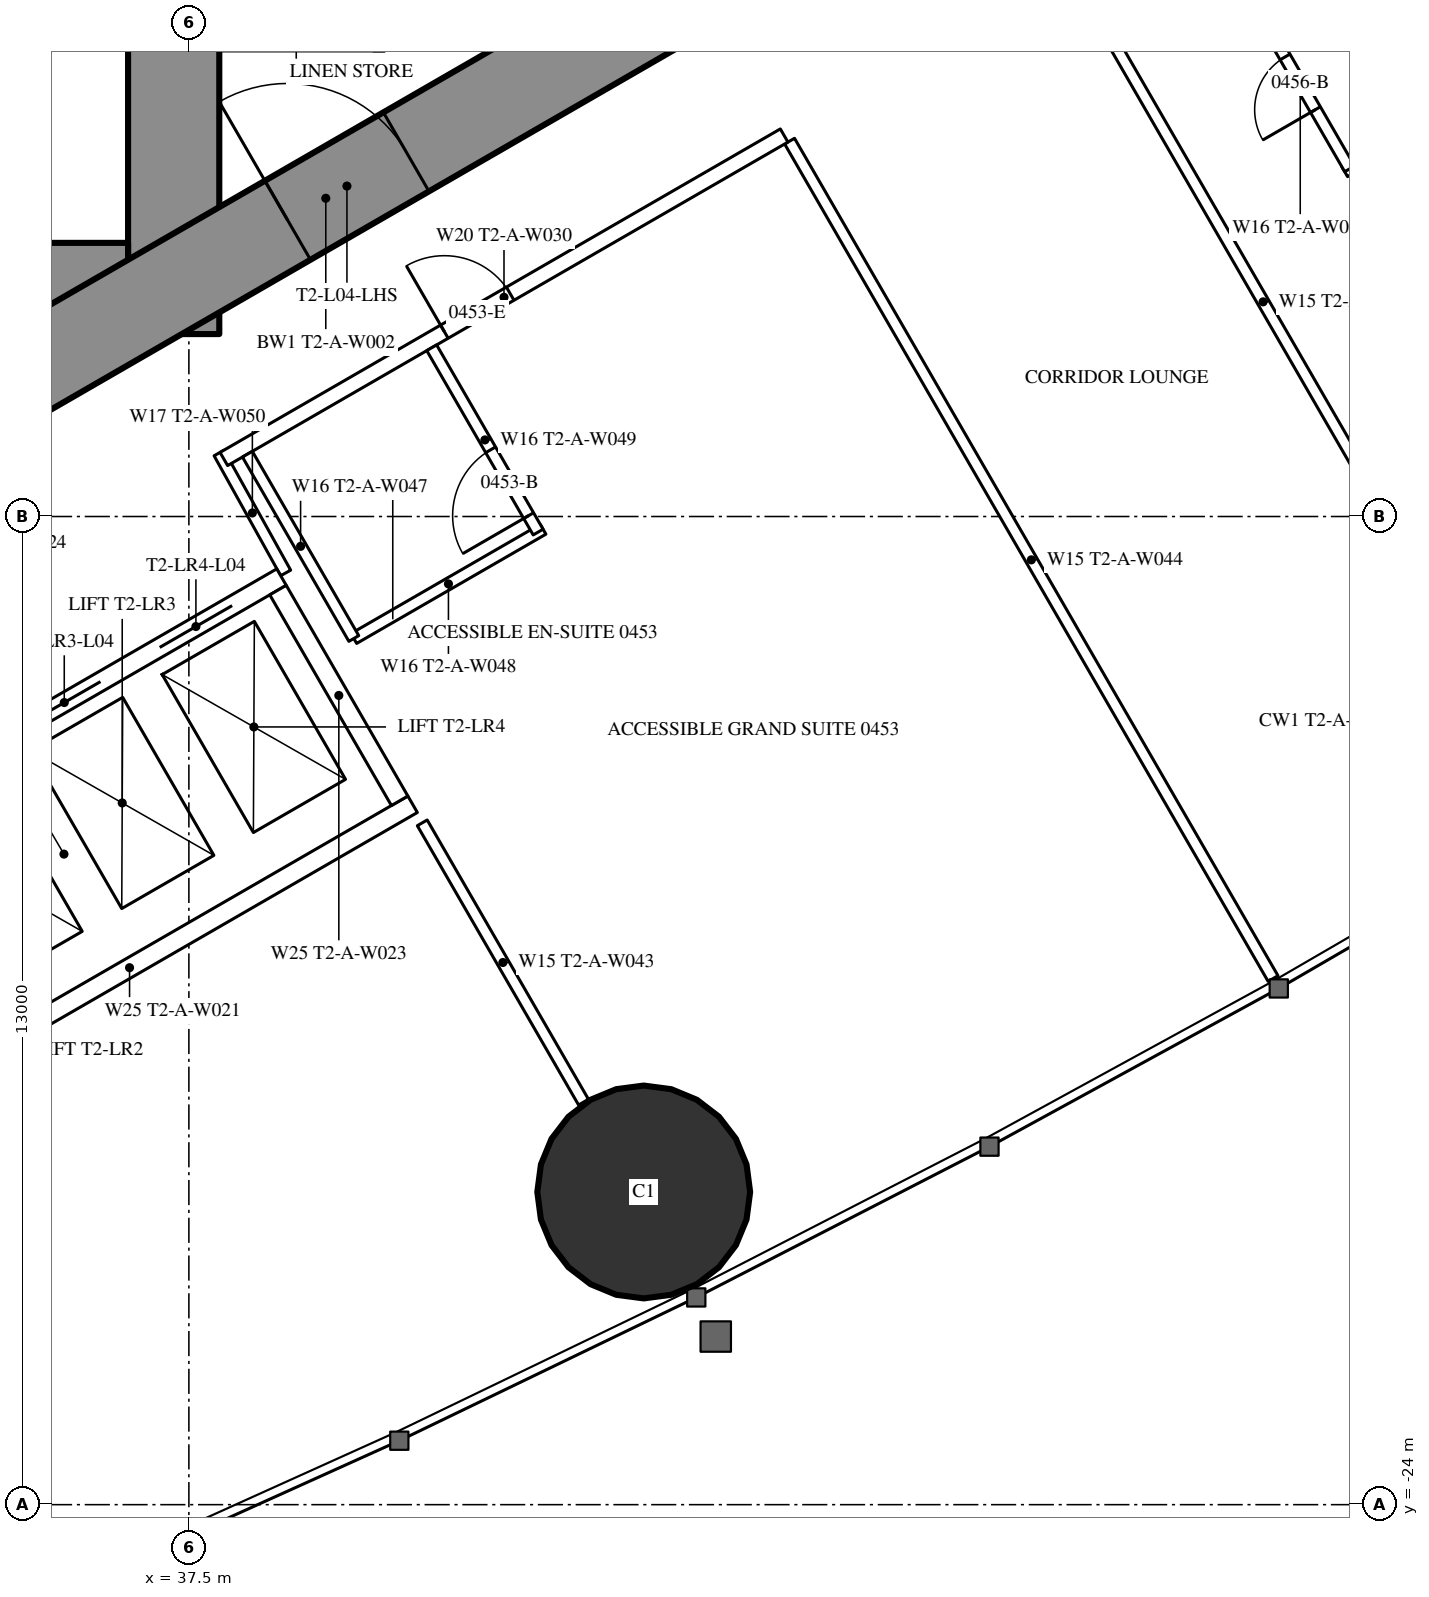
"""IFC4 building model, lengths in metres.
Left out: names, types, materials, properties, quantities, classifications, styles, units other than length and angle.
Written with IfcOpenShell. Run it as: python <this file> out.ifc"""

import sys

from ifc_helpers import new_model, si_unit, direction, frame, frame_2d, origin, origin_2d, place, context, subcontext, project, spatial, rectangle, hollow_circle, extrude, element, fill, save


model = new_model("IFC4")
c1 = context("Model", 3, precision=1e-05, world=origin(), true_north=direction((0.0, 1.0)))
c2 = subcontext(c1, "Body", "Model", "MODEL_VIEW")
j1 = project(units=[si_unit("LENGTHUNIT", "METRE"), si_unit("PLANEANGLEUNIT", "RADIAN")], contexts=[c1])
p1 = place(None, origin())
s1 = spatial("IfcSite", under=j1, at=p1, CompositionType="ELEMENT")
p2 = place(p1, origin())
s2 = spatial("IfcBuilding", under=s1, at=p2, CompositionType="ELEMENT")
p3 = place(p2, frame((0.0, 0.0, 21.5)))
s3 = spatial("IfcBuildingStorey", under=s2, at=p3, CompositionType="ELEMENT", Elevation=21.5)
p4 = place(p3, frame((43.484, -19.886, 0.0), z_axis=(0.0, 0.0, 1.0), x_axis=(1.0, 0.0, 0.0)))
e1 = element("IfcColumn", 1, at=p4, inside=s3, PredefinedType="COLUMN", context=c2, shape_type="SweptSolid", body=[
    extrude(hollow_circle(Radius=1.4, WallThickness=0.12, at=origin_2d()), origin(), (0.0, 0.0, 1.0), 3.5),
])
p5 = place(p3, frame((37.3, -8.6, 0.0), z_axis=(0.0, 0.0, 1.0), x_axis=(0.0, 1.0, 0.0)))
e2 = element("IfcWall", 2, at=p5, inside=s3, PredefinedType="SHEAR", context=c2, shape_type="SweptSolid", body=[
    extrude(rectangle(XDim=17.2, YDim=1.2, at=frame_2d((8.6, 0.0))), origin(), (0.0, 0.0, 1.0), 3.5),
])
p6 = place(p5, frame((7.7, 0.0, 0.0)))
e3 = element("IfcOpeningElement", 3, at=p6, cuts=e2, PredefinedType="OPENING", context=c2, shape_type="SweptSolid", body=[
    extrude(rectangle(XDim=1.8, YDim=2.2, at=frame_2d((0.9, 1.1))), frame((0.0, 0.61, 0.0), z_axis=(0.0, -1.0, 0.0), x_axis=(1.0, 0.0, 0.0)), (0.0, 0.0, 1.0), 1.22),
])
p7 = place(p3, frame((28.3, -8.0, 0.0), z_axis=(0.0, 0.0, 1.0), x_axis=(1.0, 0.0, 0.0)))
e4 = element("IfcWall", 4, at=p7, inside=s3, PredefinedType="SHEAR", context=c2, shape_type="SweptSolid", body=[
    extrude(rectangle(XDim=8.4, YDim=1.2, at=frame_2d((4.2, 0.0))), origin(), (0.0, 0.0, 1.0), 3.5),
])
p8 = place(p7, frame((0.25, 0.0, 0.0)))
e5 = element("IfcOpeningElement", 5, at=p8, cuts=e4, PredefinedType="OPENING", context=c2, shape_type="SweptSolid", body=[
    extrude(rectangle(XDim=1.0, YDim=2.2, at=frame_2d((0.5, 1.1))), frame((0.0, 0.61, 0.0), z_axis=(0.0, -1.0, 0.0), x_axis=(1.0, 0.0, 0.0)), (0.0, 0.0, 1.0), 1.22),
])
p9 = place(p3, frame((27.2, -13.8, 0.0), z_axis=(0.0, 0.0, 1.0), x_axis=(0.866027159892, 0.499996958321, 0.0)))
e6 = element("IfcWall", 6, at=p9, inside=s3, PredefinedType="SHEAR", context=c2, shape_type="SweptSolid", body=[
    extrude(rectangle(XDim=27.947, YDim=1.2, at=frame_2d((13.973, 0.0))), origin(), (0.0, 0.0, 1.0), 3.5),
])
p10 = place(p9, frame((4.6, 0.0, 0.0)))
e7 = element("IfcOpeningElement", 7, at=p10, cuts=e6, PredefinedType="OPENING", context=c2, shape_type="SweptSolid", body=[
    extrude(rectangle(XDim=1.0, YDim=2.2, at=frame_2d((0.5, 1.1))), frame((0.0, 0.61, 0.0), z_axis=(0.0, -1.0, 0.0), x_axis=(1.0, 0.0, 0.0)), (0.0, 0.0, 1.0), 1.22),
])
p11 = place(p9, frame((13.395, 0.0, 0.0)))
e8 = element("IfcOpeningElement", 8, at=p11, cuts=e6, PredefinedType="OPENING", context=c2, shape_type="SweptSolid", body=[
    extrude(rectangle(XDim=1.8, YDim=2.2, at=frame_2d((0.9, 1.1))), frame((0.0, 0.61, 0.0), z_axis=(0.0, -1.0, 0.0), x_axis=(1.0, 0.0, 0.0)), (0.0, 0.0, 1.0), 1.22),
])
p12 = place(p3, frame((45.403, -6.062, 0.0), z_axis=(0.0, 0.0, 1.0), x_axis=(0.500007077968, -0.866021317279, 0.0)))
e9 = element("IfcWall", 9, at=p12, inside=s3, PredefinedType="PARTITIONING", context=c2, shape_type="SweptSolid", body=[
    extrude(rectangle(XDim=12.721, YDim=0.15, at=frame_2d((6.361, 0.0))), origin(), (0.0, 0.0, 1.0), 3.25),
])
p13 = place(p3, frame((49.159, -3.893, 0.0), z_axis=(0.0, 0.0, 1.0), x_axis=(0.499998773722, -0.866026111775, 0.0)))
e10 = element("IfcWall", 10, at=p13, inside=s3, PredefinedType="PARTITIONING", context=c2, shape_type="SweptSolid", body=[
    extrude(rectangle(XDim=9.892, YDim=0.15, at=frame_2d((4.946, 0.0))), origin(), (0.0, 0.0, 1.0), 2.25),
])
p14 = place(p3, frame((40.57, -15.03, 0.0), z_axis=(0.0, 0.0, 1.0), x_axis=(0.500012993597, -0.866017901798, 0.0)))
e11 = element("IfcWall", 11, at=p14, inside=s3, PredefinedType="PARTITIONING", context=c2, shape_type="SweptSolid", body=[
    extrude(rectangle(XDim=4.243, YDim=0.15, at=frame_2d((2.122, 0.0))), origin(), (0.0, 0.0, 1.0), 3.25),
])
p15 = place(p3, frame((38.773, -11.742, 0.0), z_axis=(0.0, 0.0, 1.0), x_axis=(-0.485528096672, 0.8742210632, 0.0)))
e12 = element("IfcWall", 12, at=p15, inside=s3, PredefinedType="PARTITIONING", context=c2, shape_type="SweptSolid", body=[
    extrude(rectangle(XDim=1.805, YDim=0.15, at=frame_2d((0.903, 0.0))), origin(), (0.0, 0.0, 1.0), 3.25),
])
p16 = place(p3, frame((37.96, -10.243, 0.0), z_axis=(0.0, 0.0, 1.0), x_axis=(0.866024617314, 0.500001362204, 0.0)))
e13 = element("IfcWall", 13, at=p16, inside=s3, PredefinedType="PARTITIONING", context=c2, shape_type="SweptSolid", body=[
    extrude(rectangle(XDim=8.512, YDim=0.2, at=frame_2d((4.256, 0.0))), origin(), (0.0, 0.0, 1.0), 3.25),
])
p17 = place(p16, frame((3.35, 0.0, 0.0)))
e14 = element("IfcOpeningElement", 14, at=p17, cuts=e13, PredefinedType="OPENING", context=c2, shape_type="SweptSolid", body=[
    extrude(rectangle(XDim=1.0, YDim=2.2, at=frame_2d((0.5, 1.1))), frame((0.0, 0.11, 0.0), z_axis=(0.0, -1.0, 0.0), x_axis=(1.0, 0.0, 0.0)), (0.0, 0.0, 1.0), 0.22),
])
p18 = place(p3, frame((52.706, -6.464, 0.0), z_axis=(0.0, 0.0, 1.0), x_axis=(0.86604923931, 0.499958713387, 0.0)))
e15 = element("IfcWall", 15, at=p18, inside=s3, PredefinedType="PARTITIONING", context=c2, shape_type="SweptSolid", body=[
    extrude(rectangle(XDim=2.475, YDim=0.15, at=frame_2d((1.237, 0.0))), origin(), (0.0, 0.0, 1.0), 3.25),
])
p19 = place(p3, frame((51.471, -4.175, 0.0), z_axis=(0.0, 0.0, 1.0), x_axis=(0.500006934395, -0.866021400173, 0.0)))
e16 = element("IfcWall", 16, at=p19, inside=s3, PredefinedType="PARTITIONING", context=c2, shape_type="SweptSolid", body=[
    extrude(rectangle(XDim=2.6, YDim=0.15, at=frame_2d((1.3, 0.0))), origin(), (0.0, 0.0, 1.0), 3.25),
])
p20 = place(p19, frame((0.9, 0.0, 0.0)))
e17 = element("IfcOpeningElement", 17, at=p20, cuts=e16, PredefinedType="OPENING", context=c2, shape_type="SweptSolid", body=[
    extrude(rectangle(XDim=0.8, YDim=2.2, at=frame_2d((0.4, 1.1))), frame((0.0, 0.085, 0.0), z_axis=(0.0, -1.0, 0.0), x_axis=(1.0, 0.0, 0.0)), (0.0, 0.0, 1.0), 0.17),
])
p21 = place(p3, frame((39.67, -12.605, 0.0), z_axis=(0.0, 0.0, 1.0), x_axis=(0.866018712932, 0.500011588718, 0.0)))
e18 = element("IfcWall", 18, at=p21, inside=s3, PredefinedType="PARTITIONING", context=c2, shape_type="SweptSolid", body=[
    extrude(rectangle(XDim=2.875, YDim=0.15, at=frame_2d((1.438, 0.0))), origin(), (0.0, 0.0, 1.0), 3.25),
])
p22 = place(p3, frame((40.695, -8.78, 0.0), z_axis=(0.0, 0.0, 1.0), x_axis=(0.500049511043, -0.865996816683, 0.0)))
e19 = element("IfcWall", 19, at=p22, inside=s3, PredefinedType="PARTITIONING", context=c2, shape_type="SweptSolid", body=[
    extrude(rectangle(XDim=2.8, YDim=0.15, at=frame_2d((1.4, 0.0))), origin(), (0.0, 0.0, 1.0), 3.25),
])
p23 = place(p22, frame((1.55, 0.0, 0.0)))
e20 = element("IfcOpeningElement", 20, at=p23, cuts=e19, PredefinedType="OPENING", context=c2, shape_type="SweptSolid", body=[
    extrude(rectangle(XDim=1.0, YDim=2.2, at=frame_2d((0.5, 1.1))), frame((0.0, 0.085, 0.0), z_axis=(0.0, -1.0, 0.0), x_axis=(1.0, 0.0, 0.0)), (0.0, 0.0, 1.0), 0.17),
])
p24 = place(p3, frame((38.27, -10.18, 0.0), z_axis=(0.0, 0.0, 1.0), x_axis=(0.500049511043, -0.865996816683, 0.0)))
e21 = element("IfcWall", 21, at=p24, inside=s3, PredefinedType="PARTITIONING", context=c2, shape_type="SweptSolid", body=[
    extrude(rectangle(XDim=2.8, YDim=0.15, at=frame_2d((1.4, 0.0))), origin(), (0.0, 0.0, 1.0), 3.25),
])
p25 = place(p3, frame((31.271, -16.097, 0.0), z_axis=(0.0, 0.0, 1.0), x_axis=(0.86604045752, 0.499973925258, 0.0)))
e22 = element("IfcWall", 22, at=p25, inside=s3, PredefinedType="PARTITIONING", context=c2, shape_type="SweptSolid", body=[
    extrude(rectangle(XDim=8.6, YDim=0.25, at=frame_2d((4.3, 0.0))), origin(), (0.0, 0.0, 1.0), 3.25),
])
p26 = place(p25, frame((0.75, 0.0, 0.0)))
e23 = element("IfcOpeningElement", 23, at=p26, cuts=e22, PredefinedType="OPENING", context=c2, shape_type="SweptSolid", body=[
    extrude(rectangle(XDim=1.1, YDim=2.2, at=frame_2d((0.55, 1.1))), frame((0.0, 0.135, 0.0), z_axis=(0.0, -1.0, 0.0), x_axis=(1.0, 0.0, 0.0)), (0.0, 0.0, 1.0), 0.27),
])
p27 = place(p25, frame((2.75, 0.0, 0.0)))
e24 = element("IfcOpeningElement", 24, at=p27, cuts=e22, PredefinedType="OPENING", context=c2, shape_type="SweptSolid", body=[
    extrude(rectangle(XDim=1.1, YDim=2.2, at=frame_2d((0.55, 1.1))), frame((0.0, 0.135, 0.0), z_axis=(0.0, -1.0, 0.0), x_axis=(1.0, 0.0, 0.0)), (0.0, 0.0, 1.0), 0.27),
])
p28 = place(p25, frame((4.75, 0.0, 0.0)))
e25 = element("IfcOpeningElement", 25, at=p28, cuts=e22, PredefinedType="OPENING", context=c2, shape_type="SweptSolid", body=[
    extrude(rectangle(XDim=1.1, YDim=2.2, at=frame_2d((0.55, 1.1))), frame((0.0, 0.135, 0.0), z_axis=(0.0, -1.0, 0.0), x_axis=(1.0, 0.0, 0.0)), (0.0, 0.0, 1.0), 0.27),
])
p29 = place(p25, frame((6.75, 0.0, 0.0)))
e26 = element("IfcOpeningElement", 26, at=p29, cuts=e22, PredefinedType="OPENING", context=c2, shape_type="SweptSolid", body=[
    extrude(rectangle(XDim=1.1, YDim=2.2, at=frame_2d((0.55, 1.1))), frame((0.0, 0.135, 0.0), z_axis=(0.0, -1.0, 0.0), x_axis=(1.0, 0.0, 0.0)), (0.0, 0.0, 1.0), 0.27),
])
p30 = place(p3, frame((32.996, -19.086, 0.0), z_axis=(0.0, 0.0, 1.0), x_axis=(0.866028165386, 0.499995216735, 0.0)))
e27 = element("IfcWall", 27, at=p30, inside=s3, PredefinedType="PARTITIONING", context=c2, shape_type="SweptSolid", body=[
    extrude(rectangle(XDim=8.6, YDim=0.25, at=frame_2d((4.3, 0.0))), origin(), (0.0, 0.0, 1.0), 3.25),
])
p31 = place(p3, frame((38.673, -11.968, 0.0), z_axis=(0.0, 0.0, 1.0), x_axis=(0.499929347863, -0.866066190972, 0.0)))
e28 = element("IfcWall", 28, at=p31, inside=s3, PredefinedType="PARTITIONING", context=c2, shape_type="SweptSolid", body=[
    extrude(rectangle(XDim=3.201, YDim=0.25, at=frame_2d((1.6, 0.0))), origin(), (0.0, 0.0, 1.0), 3.25),
])
p32 = place(p20, origin())
e29 = element("IfcDoor", 29, at=p32, inside=s3, OperationType="SINGLE_SWING_RIGHT", PredefinedType="DOOR", context=c2, shape_type="SweptSolid", body=[
    extrude(rectangle(XDim=0.8, YDim=2.2, at=frame_2d((0.4, 1.1))), frame((0.0, 0.025, 0.0), z_axis=(0.0, -1.0, 0.0), x_axis=(1.0, 0.0, 0.0)), (0.0, 0.0, 1.0), 0.05),
])
fill(e17, e29)
p33 = place(p23, origin())
e30 = element("IfcDoor", 30, at=p33, inside=s3, OperationType="SINGLE_SWING_RIGHT", PredefinedType="DOOR", context=c2, shape_type="SweptSolid", body=[
    extrude(rectangle(XDim=1.0, YDim=2.2, at=frame_2d((0.5, 1.1))), frame((0.0, 0.025, 0.0), z_axis=(0.0, -1.0, 0.0), x_axis=(1.0, 0.0, 0.0)), (0.0, 0.0, 1.0), 0.05),
])
fill(e20, e30)
p34 = place(p17, origin())
e31 = element("IfcDoor", 31, at=p34, inside=s3, OperationType="SINGLE_SWING_LEFT", PredefinedType="DOOR", context=c2, shape_type="SweptSolid", body=[
    extrude(rectangle(XDim=1.0, YDim=2.2, at=frame_2d((0.5, 1.1))), frame((0.0, 0.025, 0.0), z_axis=(0.0, -1.0, 0.0), x_axis=(1.0, 0.0, 0.0)), (0.0, 0.0, 1.0), 0.05),
])
fill(e14, e31)
p35 = place(p11, origin())
e32 = element("IfcDoor", 32, at=p35, inside=s3, OperationType="DOUBLE_DOOR_SINGLE_SWING", PredefinedType="DOOR", context=c2, shape_type="SweptSolid", body=[
    extrude(rectangle(XDim=1.8, YDim=2.2, at=frame_2d((0.9, 1.1))), frame((0.0, 0.025, 0.0), z_axis=(0.0, -1.0, 0.0), x_axis=(1.0, 0.0, 0.0)), (0.0, 0.0, 1.0), 0.05),
])
fill(e8, e32)
p36 = place(p28, origin())
e33 = element("IfcDoor", 33, at=p36, inside=s3, OperationType="DOUBLE_DOOR_SLIDING", PredefinedType="USERDEFINED", context=c2, shape_type="SweptSolid", body=[
    extrude(rectangle(XDim=1.1, YDim=2.2, at=frame_2d((0.55, 1.1))), frame((0.0, 0.025, 0.0), z_axis=(0.0, -1.0, 0.0), x_axis=(1.0, 0.0, 0.0)), (0.0, 0.0, 1.0), 0.05),
])
fill(e25, e33)
p37 = place(p29, origin())
e34 = element("IfcDoor", 34, at=p37, inside=s3, OperationType="DOUBLE_DOOR_SLIDING", PredefinedType="USERDEFINED", context=c2, shape_type="SweptSolid", body=[
    extrude(rectangle(XDim=1.1, YDim=2.2, at=frame_2d((0.55, 1.1))), frame((0.0, 0.025, 0.0), z_axis=(0.0, -1.0, 0.0), x_axis=(1.0, 0.0, 0.0)), (0.0, 0.0, 1.0), 0.05),
])
fill(e26, e34)
save(model, sys.argv[1])
